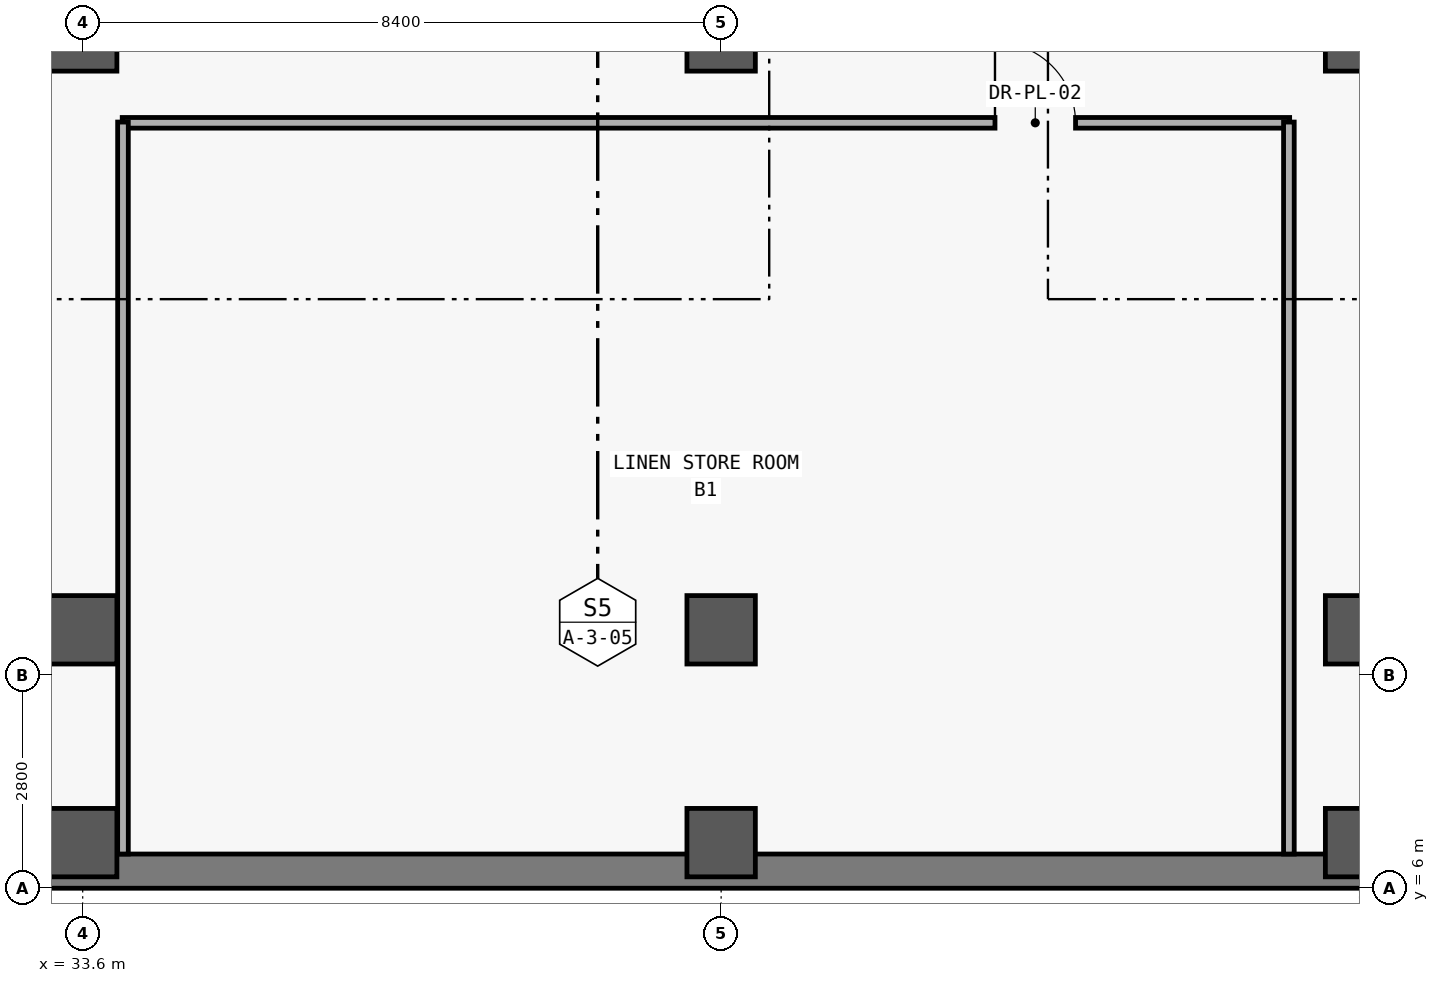
"""IFC4 building model, lengths in metres.
Left out: names, types, materials, properties, quantities, classifications, styles, units other than length and angle.
Written with IfcOpenShell. Run it as: python <this file> out.ifc"""

import sys

from ifc_helpers import new_model, si_unit, direction, frame, frame_2d, origin, origin_2d, place, context, subcontext, project, spatial, rectangle, extrude, element, fill, save


model = new_model("IFC4")
c1 = context("Model", 3, precision=1e-05, world=origin(), true_north=direction((0.0, 1.0)))
c2 = subcontext(c1, "Body", "Model", "MODEL_VIEW")
j1 = project(units=[si_unit("LENGTHUNIT", "METRE"), si_unit("PLANEANGLEUNIT", "RADIAN")], contexts=[c1])
p1 = place(None, origin())
s1 = spatial("IfcSite", under=j1, at=p1, CompositionType="ELEMENT")
p2 = place(p1, origin())
s2 = spatial("IfcBuilding", under=s1, at=p2, CompositionType="ELEMENT")
p3 = place(p2, frame((0.0, 0.0, -4.8)))
s3 = spatial("IfcBuildingStorey", under=s2, at=p3, CompositionType="ELEMENT", Elevation=-4.8)
p4 = place(p3, frame((142.2, 6.225, 0.0), z_axis=(0.0, 0.0, 1.0), x_axis=(-1.0, 0.0, 0.0)))
e1 = element("IfcWall", 1, at=p4, inside=s3, PredefinedType="USERDEFINED", context=c2, shape_type="SweptSolid", body=[
    extrude(rectangle(XDim=133.35, YDim=0.45, at=frame_2d((66.675, 0.0))), origin(), (0.0, 0.0, 1.0), 4.48),
])
for number, where, z_axis, x_axis in (
    (2, (33.6, 6.6, 0.0), (0.0, 0.0, 1.0), (1.0, 0.0, 0.0)),
    (3, (33.6, 9.4, 0.0), (0.0, 0.0, 1.0), (1.0, 0.0, 0.0)),
    (4, (33.6, 17.2, 0.0), (0.0, 0.0, 1.0), (1.0, 0.0, 0.0)),
    (5, (42.0, 6.6, 0.0), (0.0, 0.0, 1.0), (1.0, 0.0, 0.0)),
    (6, (42.0, 9.4, 0.0), (0.0, 0.0, 1.0), (1.0, 0.0, 0.0)),
    (7, (42.0, 17.2, 0.0), (0.0, 0.0, 1.0), (1.0, 0.0, 0.0)),
    (8, (50.4, 6.6, 0.0), (0.0, 0.0, 1.0), (1.0, 0.0, 0.0)),
    (9, (50.4, 9.4, 0.0), (0.0, 0.0, 1.0), (1.0, 0.0, 0.0)),
    (10, (50.4, 17.2, 0.0), (0.0, 0.0, 1.0), (1.0, 0.0, 0.0)),
):
    element("IfcColumn", number, at=place(p3, frame(where, z_axis=z_axis, x_axis=x_axis)), inside=s3, PredefinedType="COLUMN", context=c2, shape_type="SweptSolid", body=[
        extrude(rectangle(XDim=0.9, YDim=0.9, at=origin_2d()), origin(), (0.0, 0.0, 1.0), 4.8),
    ])
p5 = place(p3, frame((34.12, 16.07, 0.0), z_axis=(0.0, 0.0, 1.0), x_axis=(1.0, 0.0, 0.0)))
e11 = element("IfcWall", 11, at=p5, inside=s3, PredefinedType="PARTITIONING", context=c2, shape_type="SweptSolid", body=[
    extrude(rectangle(XDim=15.36, YDim=0.14, at=frame_2d((7.68, 0.0))), origin(), (0.0, 0.0, 1.0), 3.58),
])
p6 = place(p5, frame((11.483, 0.0, 0.0)))
e12 = element("IfcOpeningElement", 12, at=p6, cuts=e11, PredefinedType="OPENING", context=c2, shape_type="SweptSolid", body=[
    extrude(rectangle(XDim=1.06, YDim=2.2, at=frame_2d((0.53, 1.1))), frame((0.0, 0.08, 0.0), z_axis=(0.0, -1.0, 0.0), x_axis=(1.0, 0.0, 0.0)), (0.0, 0.0, 1.0), 0.16),
])
for number, where, z_axis, x_axis in (
    (13, (34.13, 6.45, 0.0), (0.0, 0.0, 1.0), (0.0, 1.0, 0.0)),
    (14, (49.47, 6.45, 0.0), (0.0, 0.0, 1.0), (0.0, 1.0, 0.0)),
):
    element("IfcWall", number, at=place(p3, frame(where, z_axis=z_axis, x_axis=x_axis)), inside=s3, PredefinedType="PARTITIONING", context=c2, shape_type="SweptSolid", body=[
        extrude(rectangle(XDim=9.63, YDim=0.14, at=frame_2d((4.815, 0.0))), origin(), (0.0, 0.0, 1.0), 3.58),
    ])
p7 = place(p6, origin())
e15 = element("IfcDoor", 15, at=p7, inside=s3, OperationType="SINGLE_SWING_LEFT", PredefinedType="DOOR", context=c2, shape_type="SweptSolid", body=[
    extrude(rectangle(XDim=1.06, YDim=2.2, at=frame_2d((0.53, 1.1))), frame((0.0, 0.025, 0.0), z_axis=(0.0, -1.0, 0.0), x_axis=(1.0, 0.0, 0.0)), (0.0, 0.0, 1.0), 0.05),
])
fill(e12, e15)
save(model, sys.argv[1])
